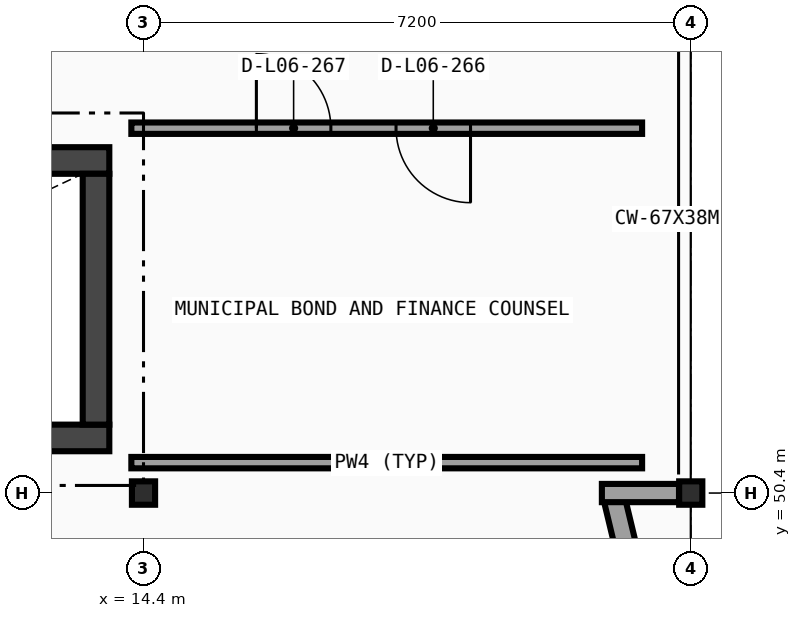
"""IFC4 building model, lengths in metres.
Left out: names, types, materials, properties, quantities, classifications, styles, units other than length and angle.
Written with IfcOpenShell. Run it as: python <this file> out.ifc"""

import sys

from ifc_helpers import new_model, si_unit, direction, frame, frame_2d, origin, origin_2d, place, context, subcontext, project, spatial, rectangle, i_section, extrude, element, fill, save


model = new_model("IFC4")
c1 = context("Model", 3, precision=1e-05, world=origin(), true_north=direction((0.0, 1.0)))
c2 = subcontext(c1, "Body", "Model", "MODEL_VIEW")
j1 = project(units=[si_unit("LENGTHUNIT", "METRE"), si_unit("PLANEANGLEUNIT", "RADIAN")], contexts=[c1])
p1 = place(None, origin())
s1 = spatial("IfcSite", under=j1, at=p1, CompositionType="ELEMENT")
p2 = place(p1, origin())
s2 = spatial("IfcBuilding", under=s1, at=p2, CompositionType="ELEMENT")
p3 = place(p2, frame((0.0, 0.0, 27.0)))
s3 = spatial("IfcBuildingStorey", under=s2, at=p3, CompositionType="ELEMENT", Elevation=27.0)
for number, where, z_axis, x_axis in (
    (1, (14.4, 50.4, 0.0), (0.0, 0.0, 1.0), (1.0, 0.0, 0.0)),
    (2, (21.6, 50.4, 0.0), (0.0, 0.0, 1.0), (1.0, 0.0, 0.0)),
):
    element("IfcColumn", number, at=place(p3, frame(where, z_axis=z_axis, x_axis=x_axis)), inside=s3, PredefinedType="COLUMN", context=c2, shape_type="SweptSolid", body=[
        extrude(i_section(OverallWidth=0.305, OverallDepth=0.308, WebThickness=0.01, FlangeThickness=0.015, FilletRadius=0.015, at=origin_2d()), origin(), (0.0, 0.0, 1.0), 4.05),
    ])
p4 = place(p3, frame((21.44, 46.8, 0.0), z_axis=(0.0, 0.0, 1.0), x_axis=(-0.233431827365, 0.972373170122, 0.0)))
e3 = element("IfcWall", 3, at=p4, inside=s3, PredefinedType="SOLIDWALL", context=c2, shape_type="SweptSolid", body=[
    extrude(rectangle(XDim=3.607, YDim=0.28, at=frame_2d((1.804, 0.0))), origin(), (0.0, 0.0, 1.0), 3.8),
])
p5 = place(p4, frame((1.004, 0.0, 0.8)))
e4 = element("IfcOpeningElement", 4, at=p5, cuts=e3, PredefinedType="OPENING", context=c2, shape_type="SweptSolid", body=[
    extrude(rectangle(XDim=1.6, YDim=1.75, at=frame_2d((0.8, 0.875))), frame((0.0, 0.15, 0.0), z_axis=(0.0, -1.0, 0.0), x_axis=(1.0, 0.0, 0.0)), (0.0, 0.0, 1.0), 0.3),
])
p6 = place(p3, frame((20.431, 50.4, 0.0), z_axis=(0.0, 0.0, 1.0), x_axis=(1.0, 0.0, 0.0)))
e5 = element("IfcWall", 5, at=p6, inside=s3, PredefinedType="SOLIDWALL", context=c2, shape_type="SweptSolid", body=[
    extrude(rectangle(XDim=1.015, YDim=0.24, at=frame_2d((0.507, 0.0))), origin(), (0.0, 0.0, 1.0), 3.8),
])
for number, where, z_axis, x_axis in (
    (6, (4.65, 51.125, 0.0), (0.0, 0.0, 1.0), (1.0, 0.0, 0.0)),
    (7, (13.95, 54.775, 0.0), (0.0, 0.0, 1.0), (-1.0, 0.0, 0.0)),
):
    element("IfcWall", number, at=place(p3, frame(where, z_axis=z_axis, x_axis=x_axis)), inside=s3, PredefinedType="SHEAR", context=c2, shape_type="SweptSolid", body=[
        extrude(rectangle(XDim=9.3, YDim=0.35, at=frame_2d((4.65, 0.0))), origin(), (0.0, 0.0, 1.0), 3.8),
    ])
p7 = place(p3, frame((13.775, 51.3, 0.0), z_axis=(0.0, 0.0, 1.0), x_axis=(0.0, 1.0, 0.0)))
e8 = element("IfcWall", 8, at=p7, inside=s3, PredefinedType="SHEAR", context=c2, shape_type="SweptSolid", body=[
    extrude(rectangle(XDim=3.3, YDim=0.35, at=frame_2d((1.65, 0.0))), origin(), (0.0, 0.0, 1.0), 3.8),
])
p8 = place(p3, frame((14.24, 50.8, 0.0), z_axis=(0.0, 0.0, 1.0), x_axis=(1.0, 0.0, 0.0)))
e9 = element("IfcWall", 9, at=p8, inside=s3, PredefinedType="PARTITIONING", context=c2, shape_type="SweptSolid", body=[
    extrude(rectangle(XDim=6.72, YDim=0.15, at=frame_2d((3.36, 0.0))), origin(), (0.0, 0.0, 1.0), 3.8),
])
p9 = place(p3, frame((14.24, 55.2, 0.0), z_axis=(0.0, 0.0, 1.0), x_axis=(1.0, 0.0, 0.0)))
e10 = element("IfcWall", 10, at=p9, inside=s3, PredefinedType="PARTITIONING", context=c2, shape_type="SweptSolid", body=[
    extrude(rectangle(XDim=6.72, YDim=0.15, at=frame_2d((3.36, 0.0))), origin(), (0.0, 0.0, 1.0), 3.8),
])
p10 = place(p9, frame((3.482, 0.0, 0.0)))
e11 = element("IfcOpeningElement", 11, at=p10, cuts=e10, PredefinedType="OPENING", context=c2, shape_type="SweptSolid", body=[
    extrude(rectangle(XDim=0.98, YDim=2.1, at=frame_2d((0.49, 1.05))), frame((0.0, 0.085, 0.0), z_axis=(0.0, -1.0, 0.0), x_axis=(1.0, 0.0, 0.0)), (0.0, 0.0, 1.0), 0.17),
])
p11 = place(p9, frame((1.645, 0.0, 0.0)))
e12 = element("IfcOpeningElement", 12, at=p11, cuts=e10, PredefinedType="OPENING", context=c2, shape_type="SweptSolid", body=[
    extrude(rectangle(XDim=0.98, YDim=2.1, at=frame_2d((0.49, 1.05))), frame((0.0, 0.085, 0.0), z_axis=(0.0, -1.0, 0.0), x_axis=(1.0, 0.0, 0.0)), (0.0, 0.0, 1.0), 0.17),
])
p12 = place(p10, origin())
e13 = element("IfcDoor", 13, at=p12, inside=s3, OperationType="SINGLE_SWING_RIGHT", PredefinedType="DOOR", context=c2, shape_type="SweptSolid", body=[
    extrude(rectangle(XDim=0.98, YDim=2.1, at=frame_2d((0.49, 1.05))), frame((0.0, 0.025, 0.0), z_axis=(0.0, -1.0, 0.0), x_axis=(1.0, 0.0, 0.0)), (0.0, 0.0, 1.0), 0.05),
])
fill(e11, e13)
p13 = place(p11, origin())
e14 = element("IfcDoor", 14, at=p13, inside=s3, OperationType="SINGLE_SWING_LEFT", PredefinedType="DOOR", context=c2, shape_type="SweptSolid", body=[
    extrude(rectangle(XDim=0.98, YDim=2.1, at=frame_2d((0.49, 1.05))), frame((0.0, 0.025, 0.0), z_axis=(0.0, -1.0, 0.0), x_axis=(1.0, 0.0, 0.0)), (0.0, 0.0, 1.0), 0.05),
])
fill(e12, e14)
save(model, sys.argv[1])
